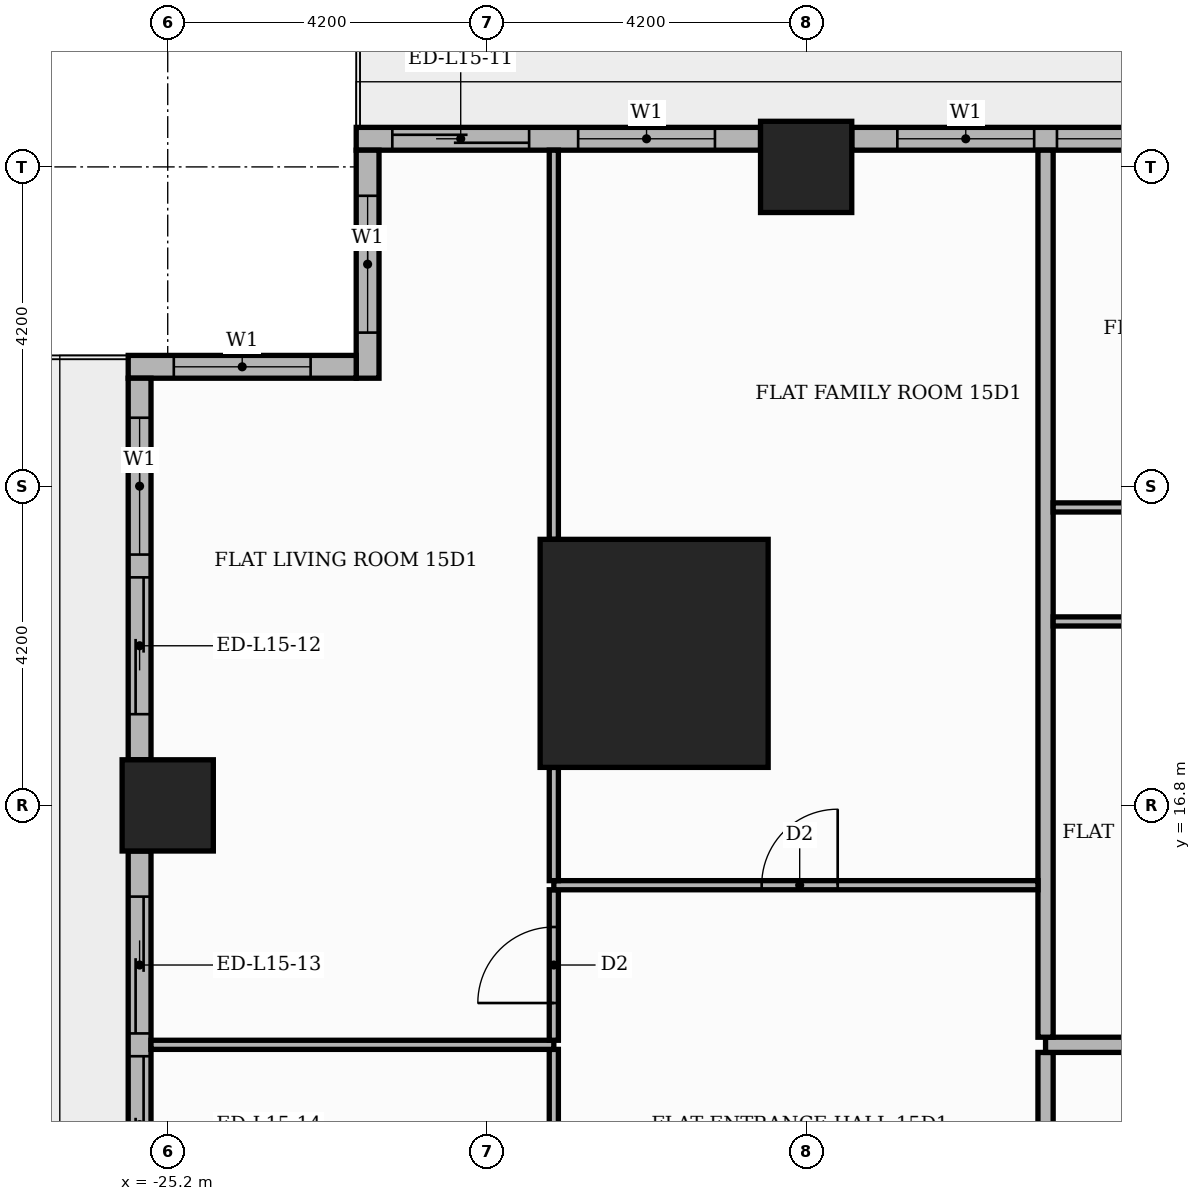
"""IFC4 building model, lengths in metres.
Left out: names, types, materials, properties, quantities, classifications, styles, units other than length and angle.
Written with IfcOpenShell. Run it as: python <this file> out.ifc"""

import sys

from ifc_helpers import new_model, si_unit, direction, frame, frame_2d, origin, origin_2d, place, context, subcontext, project, spatial, rectangle, extrude, element, fill, save


model = new_model("IFC4")
c1 = context("Model", 3, precision=1e-05, world=origin(), true_north=direction((0.0, 1.0)))
c2 = subcontext(c1, "Body", "Model", "MODEL_VIEW")
j1 = project(units=[si_unit("LENGTHUNIT", "METRE"), si_unit("PLANEANGLEUNIT", "RADIAN")], contexts=[c1])
p1 = place(None, origin())
s1 = spatial("IfcSite", under=j1, at=p1, CompositionType="ELEMENT")
p2 = place(p1, origin())
s2 = spatial("IfcBuilding", under=s1, at=p2, CompositionType="ELEMENT")
p3 = place(p2, frame((0.0, 0.0, 66.0)))
s3 = spatial("IfcBuildingStorey", under=s2, at=p3, CompositionType="ELEMENT", Elevation=66.0)
p4 = place(p3, frame((-18.8, 18.8, 0.0), z_axis=(0.0, 0.0, 1.0), x_axis=(1.0, 0.0, 0.0)))
e1 = element("IfcColumn", 1, at=p4, inside=s3, PredefinedType="COLUMN", context=c2, shape_type="SweptSolid", body=[
    extrude(rectangle(XDim=3.0, YDim=3.0, at=origin_2d()), origin(), (0.0, 0.0, 1.0), 3.9),
])
for number, where, z_axis, x_axis in (
    (2, (-16.8, 25.2, 0.0), (0.0, 0.0, 1.0), (1.0, 0.0, 0.0)),
    (3, (-25.2, 16.8, 0.0), (0.0, 0.0, 1.0), (1.0, 0.0, 0.0)),
):
    element("IfcColumn", number, at=place(p3, frame(where, z_axis=z_axis, x_axis=x_axis)), inside=s3, PredefinedType="COLUMN", context=c2, shape_type="SweptSolid", body=[
        extrude(rectangle(XDim=1.2, YDim=1.2, at=origin_2d()), origin(), (0.0, 0.0, 1.0), 3.9),
    ])
p5 = place(p3, frame((-9.0, 25.57, 0.0), z_axis=(0.0, 0.0, 1.0), x_axis=(-1.0, 0.0, 0.0)))
e4 = element("IfcWall", 4, at=p5, inside=s3, PredefinedType="STANDARD", context=c2, shape_type="SweptSolid", body=[
    extrude(rectangle(XDim=7.2, YDim=0.3, at=frame_2d((3.6, 0.0))), origin(), (0.0, 0.0, 1.0), 3.48),
])
p6 = place(p5, frame((0.6, 0.0, 0.9)))
e5 = element("IfcOpeningElement", 5, at=p6, cuts=e4, PredefinedType="OPENING", context=c2, shape_type="SweptSolid", body=[
    extrude(rectangle(XDim=3.9, YDim=2.1, at=frame_2d((1.95, 1.05))), frame((0.0, 0.16, 0.0), z_axis=(0.0, -1.0, 0.0), x_axis=(1.0, 0.0, 0.0)), (0.0, 0.0, 1.0), 0.32),
])
p7 = place(p5, frame((4.8, 0.0, 0.9)))
e6 = element("IfcOpeningElement", 6, at=p7, cuts=e4, PredefinedType="OPENING", context=c2, shape_type="SweptSolid", body=[
    extrude(rectangle(XDim=1.8, YDim=2.1, at=frame_2d((0.9, 1.05))), frame((0.0, 0.16, 0.0), z_axis=(0.0, -1.0, 0.0), x_axis=(1.0, 0.0, 0.0)), (0.0, 0.0, 1.0), 0.32),
])
p8 = place(p3, frame((-17.4, 25.57, 0.0), z_axis=(0.0, 0.0, 1.0), x_axis=(-1.0, 0.0, 0.0)))
e7 = element("IfcWall", 7, at=p8, inside=s3, PredefinedType="STANDARD", context=c2, shape_type="SweptSolid", body=[
    extrude(rectangle(XDim=5.32, YDim=0.3, at=frame_2d((2.66, 0.0))), origin(), (0.0, 0.0, 1.0), 3.48),
])
p9 = place(p8, frame((0.6, 0.0, 0.9)))
e8 = element("IfcOpeningElement", 8, at=p9, cuts=e7, PredefinedType="OPENING", context=c2, shape_type="SweptSolid", body=[
    extrude(rectangle(XDim=1.8, YDim=2.1, at=frame_2d((0.9, 1.05))), frame((0.0, 0.16, 0.0), z_axis=(0.0, -1.0, 0.0), x_axis=(1.0, 0.0, 0.0)), (0.0, 0.0, 1.0), 0.32),
])
p10 = place(p8, frame((3.045, 0.0, 0.0)))
e9 = element("IfcOpeningElement", 9, at=p10, cuts=e7, PredefinedType="OPENING", context=c2, shape_type="SweptSolid", body=[
    extrude(rectangle(XDim=1.8, YDim=2.4, at=frame_2d((0.9, 1.2))), frame((0.0, 0.16, 0.0), z_axis=(0.0, -1.0, 0.0), x_axis=(1.0, 0.0, 0.0)), (0.0, 0.0, 1.0), 0.32),
])
p11 = place(p3, frame((-22.57, 25.42, 0.0), z_axis=(0.0, 0.0, 1.0), x_axis=(0.0, -1.0, 0.0)))
e10 = element("IfcWall", 10, at=p11, inside=s3, PredefinedType="STANDARD", context=c2, shape_type="SweptSolid", body=[
    extrude(rectangle(XDim=3.0, YDim=0.3, at=frame_2d((1.5, 0.0))), origin(), (0.0, 0.0, 1.0), 3.48),
])
p12 = place(p11, frame((0.6, 0.0, 0.9)))
e11 = element("IfcOpeningElement", 11, at=p12, cuts=e10, PredefinedType="OPENING", context=c2, shape_type="SweptSolid", body=[
    extrude(rectangle(XDim=1.8, YDim=2.1, at=frame_2d((0.9, 1.05))), frame((0.0, 0.16, 0.0), z_axis=(0.0, -1.0, 0.0), x_axis=(1.0, 0.0, 0.0)), (0.0, 0.0, 1.0), 0.32),
])
p13 = place(p3, frame((-22.72, 22.57, 0.0), z_axis=(0.0, 0.0, 1.0), x_axis=(-1.0, 0.0, 0.0)))
e12 = element("IfcWall", 12, at=p13, inside=s3, PredefinedType="STANDARD", context=c2, shape_type="SweptSolid", body=[
    extrude(rectangle(XDim=3.0, YDim=0.3, at=frame_2d((1.5, 0.0))), origin(), (0.0, 0.0, 1.0), 3.48),
])
p14 = place(p13, frame((0.6, 0.0, 0.9)))
e13 = element("IfcOpeningElement", 13, at=p14, cuts=e12, PredefinedType="OPENING", context=c2, shape_type="SweptSolid", body=[
    extrude(rectangle(XDim=1.8, YDim=2.1, at=frame_2d((0.9, 1.05))), frame((0.0, 0.16, 0.0), z_axis=(0.0, -1.0, 0.0), x_axis=(1.0, 0.0, 0.0)), (0.0, 0.0, 1.0), 0.32),
])
p15 = place(p3, frame((-25.57, 22.42, 0.0), z_axis=(0.0, 0.0, 1.0), x_axis=(0.0, -1.0, 0.0)))
e14 = element("IfcWall", 14, at=p15, inside=s3, PredefinedType="STANDARD", context=c2, shape_type="SweptSolid", body=[
    extrude(rectangle(XDim=5.02, YDim=0.3, at=frame_2d((2.51, 0.0))), origin(), (0.0, 0.0, 1.0), 3.48),
])
p16 = place(p15, frame((0.52, 0.0, 0.9)))
e15 = element("IfcOpeningElement", 15, at=p16, cuts=e14, PredefinedType="OPENING", context=c2, shape_type="SweptSolid", body=[
    extrude(rectangle(XDim=1.8, YDim=2.1, at=frame_2d((0.9, 1.05))), frame((0.0, 0.16, 0.0), z_axis=(0.0, -1.0, 0.0), x_axis=(1.0, 0.0, 0.0)), (0.0, 0.0, 1.0), 0.32),
])
p17 = place(p15, frame((2.62, 0.0, 0.0)))
e16 = element("IfcOpeningElement", 16, at=p17, cuts=e14, PredefinedType="OPENING", context=c2, shape_type="SweptSolid", body=[
    extrude(rectangle(XDim=1.8, YDim=2.4, at=frame_2d((0.9, 1.2))), frame((0.0, 0.16, 0.0), z_axis=(0.0, -1.0, 0.0), x_axis=(1.0, 0.0, 0.0)), (0.0, 0.0, 1.0), 0.32),
])
p18 = place(p3, frame((-25.57, 16.2, 0.0), z_axis=(0.0, 0.0, 1.0), x_axis=(0.0, -1.0, 0.0)))
e17 = element("IfcWall", 17, at=p18, inside=s3, PredefinedType="STANDARD", context=c2, shape_type="SweptSolid", body=[
    extrude(rectangle(XDim=7.2, YDim=0.3, at=frame_2d((3.6, 0.0))), origin(), (0.0, 0.0, 1.0), 3.48),
])
p19 = place(p18, frame((0.6, 0.0, 0.0)))
e18 = element("IfcOpeningElement", 18, at=p19, cuts=e17, PredefinedType="OPENING", context=c2, shape_type="SweptSolid", body=[
    extrude(rectangle(XDim=1.8, YDim=2.4, at=frame_2d((0.9, 1.2))), frame((0.0, 0.16, 0.0), z_axis=(0.0, -1.0, 0.0), x_axis=(1.0, 0.0, 0.0)), (0.0, 0.0, 1.0), 0.32),
])
p20 = place(p18, frame((2.7, 0.0, 0.0)))
e19 = element("IfcOpeningElement", 19, at=p20, cuts=e17, PredefinedType="OPENING", context=c2, shape_type="SweptSolid", body=[
    extrude(rectangle(XDim=1.8, YDim=2.4, at=frame_2d((0.9, 1.2))), frame((0.0, 0.16, 0.0), z_axis=(0.0, -1.0, 0.0), x_axis=(1.0, 0.0, 0.0)), (0.0, 0.0, 1.0), 0.32),
])
p21 = place(p18, frame((4.8, 0.0, 0.9)))
e20 = element("IfcOpeningElement", 20, at=p21, cuts=e17, PredefinedType="OPENING", context=c2, shape_type="SweptSolid", body=[
    extrude(rectangle(XDim=1.8, YDim=2.1, at=frame_2d((0.9, 1.05))), frame((0.0, 0.16, 0.0), z_axis=(0.0, -1.0, 0.0), x_axis=(1.0, 0.0, 0.0)), (0.0, 0.0, 1.0), 0.32),
])
p22 = place(p3, frame((-13.65, 5.35, 0.0), z_axis=(0.0, 0.0, 1.0), x_axis=(0.0, 1.0, 0.0)))
e21 = element("IfcWall", 21, at=p22, inside=s3, PredefinedType="PARTITIONING", context=c2, shape_type="SweptSolid", body=[
    extrude(rectangle(XDim=8.2, YDim=0.2, at=frame_2d((4.1, 0.0))), origin(), (0.0, 0.0, 1.0), 3.48),
])
p23 = place(p22, frame((5.65, 0.0, 0.0)))
e22 = element("IfcOpeningElement", 22, at=p23, cuts=e21, PredefinedType="OPENING", context=c2, shape_type="SweptSolid", body=[
    extrude(rectangle(XDim=1.1, YDim=2.4, at=frame_2d((0.55, 1.2))), frame((0.0, 0.11, 0.0), z_axis=(0.0, -1.0, 0.0), x_axis=(1.0, 0.0, 0.0)), (0.0, 0.0, 1.0), 0.22),
])
p24 = place(p3, frame((-20.12, 9.51, 0.0), z_axis=(0.0, 0.0, 1.0), x_axis=(0.0, 1.0, 0.0)))
e23 = element("IfcWall", 23, at=p24, inside=s3, PredefinedType="PARTITIONING", context=c2, shape_type="SweptSolid", body=[
    extrude(rectangle(XDim=4.08, YDim=0.12, at=frame_2d((2.04, 0.0))), origin(), (0.0, 0.0, 1.0), 3.48),
])
p25 = place(p24, frame((1.59, 0.0, 0.0)))
e24 = element("IfcOpeningElement", 24, at=p25, cuts=e23, PredefinedType="OPENING", context=c2, shape_type="SweptSolid", body=[
    extrude(rectangle(XDim=0.9, YDim=2.1, at=frame_2d((0.45, 1.05))), frame((0.0, 0.07, 0.0), z_axis=(0.0, -1.0, 0.0), x_axis=(1.0, 0.0, 0.0)), (0.0, 0.0, 1.0), 0.14),
])
p26 = place(p3, frame((-25.42, 13.65, 0.0), z_axis=(0.0, 0.0, 1.0), x_axis=(1.0, 0.0, 0.0)))
e25 = element("IfcWall", 25, at=p26, inside=s3, PredefinedType="PARTITIONING", context=c2, shape_type="SweptSolid", body=[
    extrude(rectangle(XDim=5.3, YDim=0.12, at=frame_2d((2.65, 0.0))), origin(), (0.0, 0.0, 1.0), 3.48),
])
p27 = place(p3, frame((-13.65, 13.65, 0.0), z_axis=(0.0, 0.0, 1.0), x_axis=(1.0, 0.0, 0.0)))
e26 = element("IfcWall", 26, at=p27, inside=s3, PredefinedType="PARTITIONING", context=c2, shape_type="SweptSolid", body=[
    extrude(rectangle(XDim=39.07, YDim=0.2, at=frame_2d((19.535, 0.0))), origin(), (0.0, 0.0, 1.0), 3.48),
])
p28 = place(p27, frame((23.6, 0.0, 0.0)))
e27 = element("IfcOpeningElement", 27, at=p28, cuts=e26, PredefinedType="OPENING", context=c2, shape_type="SweptSolid", body=[
    extrude(rectangle(XDim=1.1, YDim=2.4, at=frame_2d((0.55, 1.2))), frame((0.0, 0.11, 0.0), z_axis=(0.0, -1.0, 0.0), x_axis=(1.0, 0.0, 0.0)), (0.0, 0.0, 1.0), 0.22),
])
p29 = place(p3, frame((-20.12, 13.71, 0.0), z_axis=(0.0, 0.0, 1.0), x_axis=(0.0, 1.0, 0.0)))
e28 = element("IfcWall", 28, at=p29, inside=s3, PredefinedType="PARTITIONING", context=c2, shape_type="SweptSolid", body=[
    extrude(rectangle(XDim=1.98, YDim=0.12, at=frame_2d((0.99, 0.0))), origin(), (0.0, 0.0, 1.0), 3.48),
])
p30 = place(p29, frame((0.49, 0.0, 0.0)))
e29 = element("IfcOpeningElement", 29, at=p30, cuts=e28, PredefinedType="OPENING", context=c2, shape_type="SweptSolid", body=[
    extrude(rectangle(XDim=1.0, YDim=2.1, at=frame_2d((0.5, 1.05))), frame((0.0, 0.07, 0.0), z_axis=(0.0, -1.0, 0.0), x_axis=(1.0, 0.0, 0.0)), (0.0, 0.0, 1.0), 0.14),
])
p31 = place(p3, frame((-13.65, 13.75, 0.0), z_axis=(0.0, 0.0, 1.0), x_axis=(0.0, 1.0, 0.0)))
e30 = element("IfcWall", 30, at=p31, inside=s3, PredefinedType="PARTITIONING", context=c2, shape_type="SweptSolid", body=[
    extrude(rectangle(XDim=11.67, YDim=0.2, at=frame_2d((5.835, 0.0))), origin(), (0.0, 0.0, 1.0), 3.48),
])
p32 = place(p3, frame((-20.12, 15.75, 0.0), z_axis=(0.0, 0.0, 1.0), x_axis=(1.0, 0.0, 0.0)))
e31 = element("IfcWall", 31, at=p32, inside=s3, PredefinedType="PARTITIONING", context=c2, shape_type="SweptSolid", body=[
    extrude(rectangle(XDim=6.37, YDim=0.12, at=frame_2d((3.185, 0.0))), origin(), (0.0, 0.0, 1.0), 3.48),
])
p33 = place(p32, frame((2.735, 0.0, 0.0)))
e32 = element("IfcOpeningElement", 32, at=p33, cuts=e31, PredefinedType="OPENING", context=c2, shape_type="SweptSolid", body=[
    extrude(rectangle(XDim=1.0, YDim=2.1, at=frame_2d((0.5, 1.05))), frame((0.0, 0.07, 0.0), z_axis=(0.0, -1.0, 0.0), x_axis=(1.0, 0.0, 0.0)), (0.0, 0.0, 1.0), 0.14),
])
p34 = place(p3, frame((-20.12, 15.81, 0.0), z_axis=(0.0, 0.0, 1.0), x_axis=(0.0, 1.0, 0.0)))
e33 = element("IfcWall", 33, at=p34, inside=s3, PredefinedType="PARTITIONING", context=c2, shape_type="SweptSolid", body=[
    extrude(rectangle(XDim=1.49, YDim=0.12, at=frame_2d((0.745, 0.0))), origin(), (0.0, 0.0, 1.0), 3.48),
])
p35 = place(p3, frame((-13.55, 19.22, 0.0), z_axis=(0.0, 0.0, 1.0), x_axis=(1.0, 0.0, 0.0)))
e34 = element("IfcWall", 34, at=p35, inside=s3, PredefinedType="PARTITIONING", context=c2, shape_type="SweptSolid", body=[
    extrude(rectangle(XDim=20.9, YDim=0.12, at=frame_2d((10.45, 0.0))), origin(), (0.0, 0.0, 1.0), 3.48),
])
p36 = place(p35, frame((17.3, 0.0, 0.0)))
e35 = element("IfcOpeningElement", 35, at=p36, cuts=e34, PredefinedType="OPENING", context=c2, shape_type="SweptSolid", body=[
    extrude(rectangle(XDim=0.9, YDim=2.1, at=frame_2d((0.45, 1.05))), frame((0.0, 0.07, 0.0), z_axis=(0.0, -1.0, 0.0), x_axis=(1.0, 0.0, 0.0)), (0.0, 0.0, 1.0), 0.14),
])
p37 = place(p35, frame((12.35, 0.0, 0.0)))
e36 = element("IfcOpeningElement", 36, at=p37, cuts=e34, PredefinedType="OPENING", context=c2, shape_type="SweptSolid", body=[
    extrude(rectangle(XDim=0.9, YDim=2.1, at=frame_2d((0.45, 1.05))), frame((0.0, 0.07, 0.0), z_axis=(0.0, -1.0, 0.0), x_axis=(1.0, 0.0, 0.0)), (0.0, 0.0, 1.0), 0.14),
])
p38 = place(p35, frame((9.2, 0.0, 0.0)))
e37 = element("IfcOpeningElement", 37, at=p38, cuts=e34, PredefinedType="OPENING", context=c2, shape_type="SweptSolid", body=[
    extrude(rectangle(XDim=0.9, YDim=2.1, at=frame_2d((0.45, 1.05))), frame((0.0, 0.07, 0.0), z_axis=(0.0, -1.0, 0.0), x_axis=(1.0, 0.0, 0.0)), (0.0, 0.0, 1.0), 0.14),
])
p39 = place(p35, frame((6.725, 0.0, 0.0)))
e38 = element("IfcOpeningElement", 38, at=p39, cuts=e34, PredefinedType="OPENING", context=c2, shape_type="SweptSolid", body=[
    extrude(rectangle(XDim=0.9, YDim=2.1, at=frame_2d((0.45, 1.05))), frame((0.0, 0.07, 0.0), z_axis=(0.0, -1.0, 0.0), x_axis=(1.0, 0.0, 0.0)), (0.0, 0.0, 1.0), 0.14),
])
p40 = place(p35, frame((4.7, 0.0, 0.0)))
e39 = element("IfcOpeningElement", 39, at=p40, cuts=e34, PredefinedType="OPENING", context=c2, shape_type="SweptSolid", body=[
    extrude(rectangle(XDim=0.9, YDim=2.1, at=frame_2d((0.45, 1.05))), frame((0.0, 0.07, 0.0), z_axis=(0.0, -1.0, 0.0), x_axis=(1.0, 0.0, 0.0)), (0.0, 0.0, 1.0), 0.14),
])
p41 = place(p35, frame((1.625, 0.0, 0.0)))
e40 = element("IfcOpeningElement", 40, at=p41, cuts=e34, PredefinedType="OPENING", context=c2, shape_type="SweptSolid", body=[
    extrude(rectangle(XDim=0.9, YDim=2.1, at=frame_2d((0.45, 1.05))), frame((0.0, 0.07, 0.0), z_axis=(0.0, -1.0, 0.0), x_axis=(1.0, 0.0, 0.0)), (0.0, 0.0, 1.0), 0.14),
])
p42 = place(p3, frame((-20.12, 20.3, 0.0), z_axis=(0.0, 0.0, 1.0), x_axis=(0.0, 1.0, 0.0)))
e41 = element("IfcWall", 41, at=p42, inside=s3, PredefinedType="PARTITIONING", context=c2, shape_type="SweptSolid", body=[
    extrude(rectangle(XDim=5.12, YDim=0.12, at=frame_2d((2.56, 0.0))), origin(), (0.0, 0.0, 1.0), 3.48),
])
p43 = place(p3, frame((-13.55, 20.72, 0.0), z_axis=(0.0, 0.0, 1.0), x_axis=(1.0, 0.0, 0.0)))
e42 = element("IfcWall", 42, at=p43, inside=s3, PredefinedType="PARTITIONING", context=c2, shape_type="SweptSolid", body=[
    extrude(rectangle(XDim=38.97, YDim=0.12, at=frame_2d((19.485, 0.0))), origin(), (0.0, 0.0, 1.0), 3.48),
])
p44 = place(p43, frame((25.65, 0.0, 0.0)))
e43 = element("IfcOpeningElement", 43, at=p44, cuts=e42, PredefinedType="OPENING", context=c2, shape_type="SweptSolid", body=[
    extrude(rectangle(XDim=1.0, YDim=2.1, at=frame_2d((0.5, 1.05))), frame((0.0, 0.07, 0.0), z_axis=(0.0, -1.0, 0.0), x_axis=(1.0, 0.0, 0.0)), (0.0, 0.0, 1.0), 0.14),
])
p45 = place(p43, frame((20.45, 0.0, 0.0)))
e44 = element("IfcOpeningElement", 44, at=p45, cuts=e42, PredefinedType="OPENING", context=c2, shape_type="SweptSolid", body=[
    extrude(rectangle(XDim=0.9, YDim=2.1, at=frame_2d((0.45, 1.05))), frame((0.0, 0.07, 0.0), z_axis=(0.0, -1.0, 0.0), x_axis=(1.0, 0.0, 0.0)), (0.0, 0.0, 1.0), 0.14),
])
p46 = place(p43, frame((9.95, 0.0, 0.0)))
e45 = element("IfcOpeningElement", 45, at=p46, cuts=e42, PredefinedType="OPENING", context=c2, shape_type="SweptSolid", body=[
    extrude(rectangle(XDim=0.9, YDim=2.1, at=frame_2d((0.45, 1.05))), frame((0.0, 0.07, 0.0), z_axis=(0.0, -1.0, 0.0), x_axis=(1.0, 0.0, 0.0)), (0.0, 0.0, 1.0), 0.14),
])
p47 = place(p43, frame((2.6, 0.0, 0.0)))
e46 = element("IfcOpeningElement", 46, at=p47, cuts=e42, PredefinedType="OPENING", context=c2, shape_type="SweptSolid", body=[
    extrude(rectangle(XDim=0.9, YDim=2.1, at=frame_2d((0.45, 1.05))), frame((0.0, 0.07, 0.0), z_axis=(0.0, -1.0, 0.0), x_axis=(1.0, 0.0, 0.0)), (0.0, 0.0, 1.0), 0.14),
])
p48 = place(p6, origin())
e47 = element("IfcWindow", 47, at=p48, inside=s3, PartitioningType="SINGLE_PANEL", PredefinedType="WINDOW", context=c2, shape_type="SweptSolid", body=[
    extrude(rectangle(XDim=3.9, YDim=2.1, at=frame_2d((1.95, 1.05))), frame((0.0, 0.03, 0.0), z_axis=(0.0, -1.0, 0.0), x_axis=(1.0, 0.0, 0.0)), (0.0, 0.0, 1.0), 0.06),
])
fill(e5, e47)
p49 = place(p7, origin())
e48 = element("IfcWindow", 48, at=p49, inside=s3, PartitioningType="SINGLE_PANEL", PredefinedType="WINDOW", context=c2, shape_type="SweptSolid", body=[
    extrude(rectangle(XDim=1.8, YDim=2.1, at=frame_2d((0.9, 1.05))), frame((0.0, 0.03, 0.0), z_axis=(0.0, -1.0, 0.0), x_axis=(1.0, 0.0, 0.0)), (0.0, 0.0, 1.0), 0.06),
])
fill(e6, e48)
p50 = place(p9, origin())
e49 = element("IfcWindow", 49, at=p50, inside=s3, PartitioningType="SINGLE_PANEL", PredefinedType="WINDOW", context=c2, shape_type="SweptSolid", body=[
    extrude(rectangle(XDim=1.8, YDim=2.1, at=frame_2d((0.9, 1.05))), frame((0.0, 0.03, 0.0), z_axis=(0.0, -1.0, 0.0), x_axis=(1.0, 0.0, 0.0)), (0.0, 0.0, 1.0), 0.06),
])
fill(e8, e49)
p51 = place(p10, origin())
e50 = element("IfcDoor", 50, at=p51, inside=s3, OperationType="SLIDING_TO_RIGHT", PredefinedType="DOOR", context=c2, shape_type="SweptSolid", body=[
    extrude(rectangle(XDim=1.8, YDim=2.4, at=frame_2d((0.9, 1.2))), frame((0.0, 0.025, 0.0), z_axis=(0.0, -1.0, 0.0), x_axis=(1.0, 0.0, 0.0)), (0.0, 0.0, 1.0), 0.05),
])
fill(e9, e50)
p52 = place(p12, origin())
e51 = element("IfcWindow", 51, at=p52, inside=s3, PartitioningType="SINGLE_PANEL", PredefinedType="WINDOW", context=c2, shape_type="SweptSolid", body=[
    extrude(rectangle(XDim=1.8, YDim=2.1, at=frame_2d((0.9, 1.05))), frame((0.0, 0.03, 0.0), z_axis=(0.0, -1.0, 0.0), x_axis=(1.0, 0.0, 0.0)), (0.0, 0.0, 1.0), 0.06),
])
fill(e11, e51)
p53 = place(p14, origin())
e52 = element("IfcWindow", 52, at=p53, inside=s3, PartitioningType="SINGLE_PANEL", PredefinedType="WINDOW", context=c2, shape_type="SweptSolid", body=[
    extrude(rectangle(XDim=1.8, YDim=2.1, at=frame_2d((0.9, 1.05))), frame((0.0, 0.03, 0.0), z_axis=(0.0, -1.0, 0.0), x_axis=(1.0, 0.0, 0.0)), (0.0, 0.0, 1.0), 0.06),
])
fill(e13, e52)
p54 = place(p16, origin())
e53 = element("IfcWindow", 53, at=p54, inside=s3, PartitioningType="SINGLE_PANEL", PredefinedType="WINDOW", context=c2, shape_type="SweptSolid", body=[
    extrude(rectangle(XDim=1.8, YDim=2.1, at=frame_2d((0.9, 1.05))), frame((0.0, 0.03, 0.0), z_axis=(0.0, -1.0, 0.0), x_axis=(1.0, 0.0, 0.0)), (0.0, 0.0, 1.0), 0.06),
])
fill(e15, e53)
p55 = place(p17, origin())
e54 = element("IfcDoor", 54, at=p55, inside=s3, OperationType="SLIDING_TO_RIGHT", PredefinedType="DOOR", context=c2, shape_type="SweptSolid", body=[
    extrude(rectangle(XDim=1.8, YDim=2.4, at=frame_2d((0.9, 1.2))), frame((0.0, 0.025, 0.0), z_axis=(0.0, -1.0, 0.0), x_axis=(1.0, 0.0, 0.0)), (0.0, 0.0, 1.0), 0.05),
])
fill(e16, e54)
p56 = place(p19, origin())
e55 = element("IfcDoor", 55, at=p56, inside=s3, OperationType="SLIDING_TO_LEFT", PredefinedType="DOOR", context=c2, shape_type="SweptSolid", body=[
    extrude(rectangle(XDim=1.8, YDim=2.4, at=frame_2d((0.9, 1.2))), frame((0.0, 0.025, 0.0), z_axis=(0.0, -1.0, 0.0), x_axis=(1.0, 0.0, 0.0)), (0.0, 0.0, 1.0), 0.05),
])
fill(e18, e55)
p57 = place(p20, origin())
e56 = element("IfcDoor", 56, at=p57, inside=s3, OperationType="SLIDING_TO_RIGHT", PredefinedType="DOOR", context=c2, shape_type="SweptSolid", body=[
    extrude(rectangle(XDim=1.8, YDim=2.4, at=frame_2d((0.9, 1.2))), frame((0.0, 0.025, 0.0), z_axis=(0.0, -1.0, 0.0), x_axis=(1.0, 0.0, 0.0)), (0.0, 0.0, 1.0), 0.05),
])
fill(e19, e56)
p58 = place(p33, origin())
e57 = element("IfcDoor", 57, at=p58, inside=s3, OperationType="SINGLE_SWING_RIGHT", PredefinedType="DOOR", context=c2, shape_type="SweptSolid", body=[
    extrude(rectangle(XDim=1.0, YDim=2.1, at=frame_2d((0.5, 1.05))), frame((0.0, 0.025, 0.0), z_axis=(0.0, -1.0, 0.0), x_axis=(1.0, 0.0, 0.0)), (0.0, 0.0, 1.0), 0.05),
])
fill(e32, e57)
p59 = place(p30, origin())
e58 = element("IfcDoor", 58, at=p59, inside=s3, OperationType="SINGLE_SWING_LEFT", PredefinedType="DOOR", context=c2, shape_type="SweptSolid", body=[
    extrude(rectangle(XDim=1.0, YDim=2.1, at=frame_2d((0.5, 1.05))), frame((0.0, 0.025, 0.0), z_axis=(0.0, -1.0, 0.0), x_axis=(1.0, 0.0, 0.0)), (0.0, 0.0, 1.0), 0.05),
])
fill(e29, e58)
save(model, sys.argv[1])
